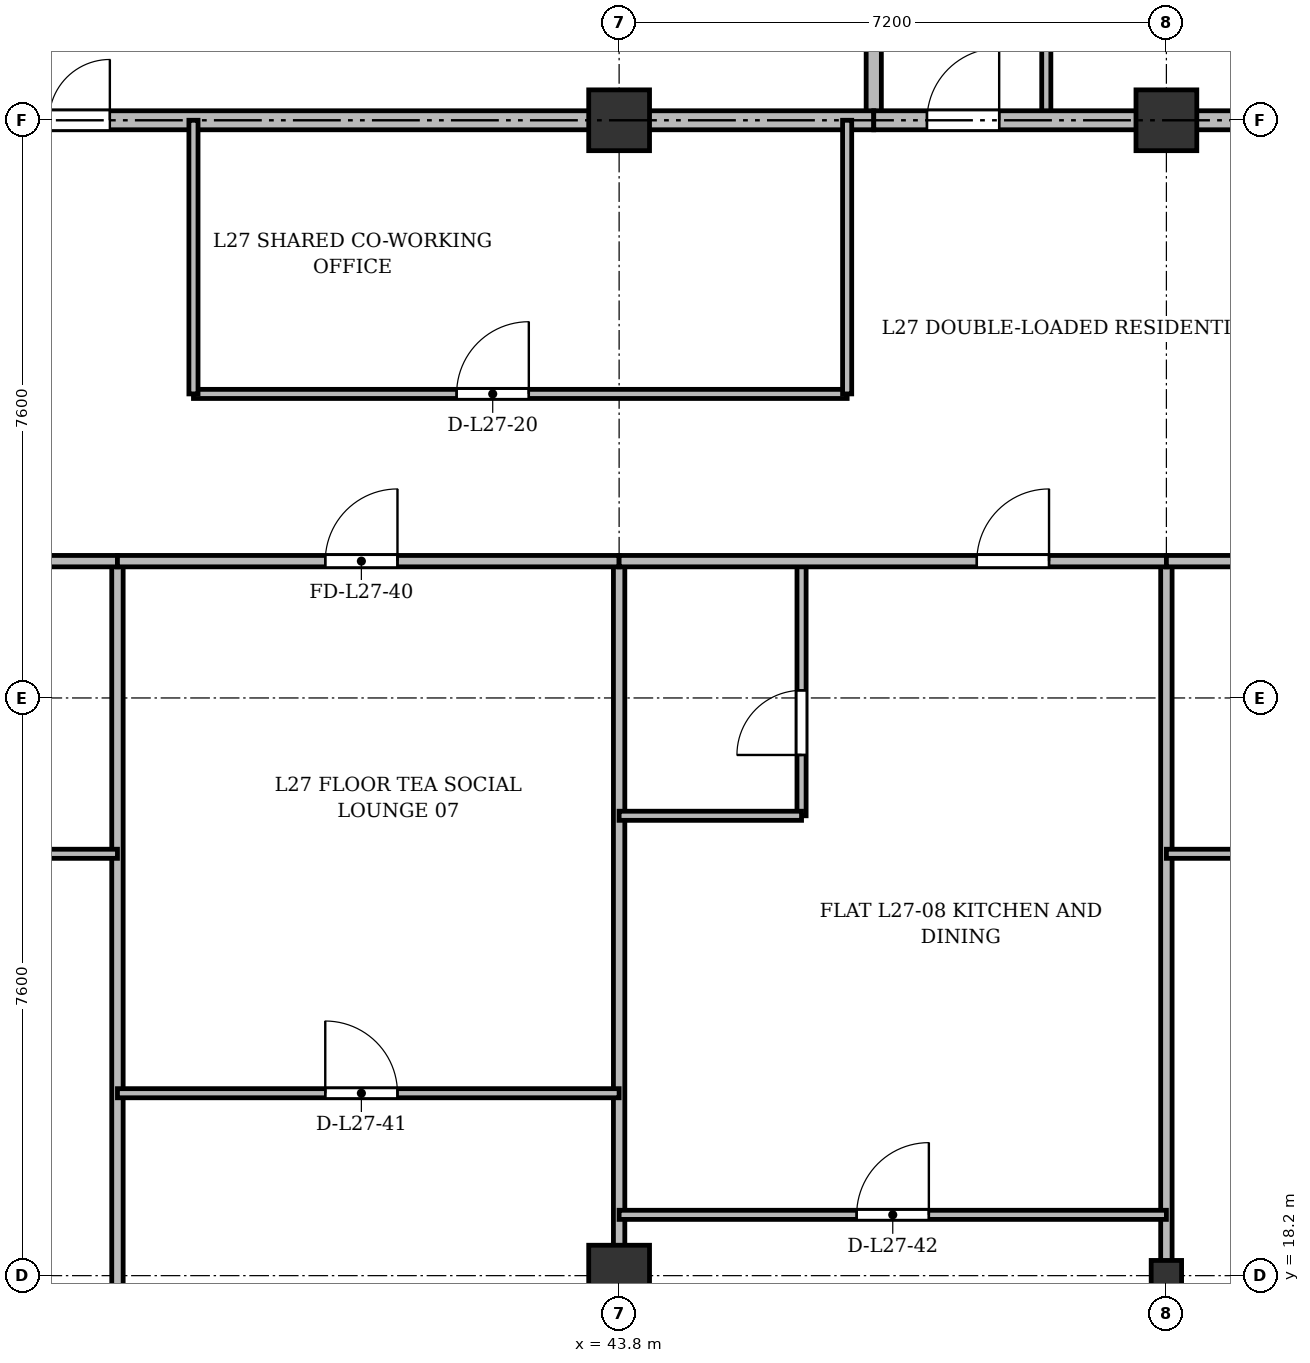
"""IFC4 building model, lengths in metres.
Left out: names, types, materials, properties, quantities, classifications, styles, units other than length and angle.
Written with IfcOpenShell. Run it as: python <this file> out.ifc"""

import sys

from ifc_helpers import new_model, si_unit, direction, frame, frame_2d, origin, origin_2d, place, context, subcontext, project, spatial, rectangle, i_section, extrude, source, transform, mapped, element, fill, save


model = new_model("IFC4")
c1 = context("Model", 3, precision=1e-05, world=origin(), true_north=direction((0.0, 1.0)))
c2 = subcontext(c1, "Body", "Model", "MODEL_VIEW")
j1 = project(units=[si_unit("LENGTHUNIT", "METRE"), si_unit("PLANEANGLEUNIT", "RADIAN")], contexts=[c1])
p1 = place(None, origin())
s1 = spatial("IfcSite", under=j1, at=p1, CompositionType="ELEMENT")
p2 = place(p1, origin())
s2 = spatial("IfcBuilding", under=s1, at=p2, CompositionType="ELEMENT")
p3 = place(p2, frame((0.0, 0.0, 106.9)))
s3 = spatial("IfcBuildingStorey", under=s2, at=p3, CompositionType="ELEMENT", Elevation=106.9)
m1 = source(origin(), c2, "Body", "SweptSolid", [
    extrude(rectangle(XDim=0.8, YDim=0.8, at=origin_2d()), origin(), (0.0, 0.0, 1.0), 3.6),
])
for number, where, z_axis, x_axis in (
    (1, (43.8, 18.2, 0.0), (0.0, 0.0, 1.0), (1.0, 0.0, 0.0)),
    (2, (43.8, 33.4, 0.0), (0.0, 0.0, 1.0), (1.0, 0.0, 0.0)),
):
    element("IfcColumn", number, at=place(p3, frame(where, z_axis=z_axis, x_axis=x_axis)), inside=s3, PredefinedType="COLUMN", context=c2, shape_type="MappedRepresentation", body=[
        mapped(m1, transform((0.0, 0.0, 0.0), x_axis=(1.0, 0.0, 0.0), y_axis=(0.0, 1.0, 0.0), z_axis=(0.0, 0.0, 1.0), scale=1.0)),
    ])
m2 = source(origin(), c2, "Body", "SweptSolid", [
    extrude(i_section(OverallWidth=0.4, OverallDepth=0.4, WebThickness=0.022, FlangeThickness=0.035, at=origin_2d()), origin(), (0.0, 0.0, 1.0), 3.6),
])
p4 = place(p3, frame((51.0, 18.2, 0.0), z_axis=(0.0, 0.0, 1.0), x_axis=(1.0, 0.0, 0.0)))
e3 = element("IfcColumn", 3, at=p4, inside=s3, PredefinedType="COLUMN", context=c2, shape_type="MappedRepresentation", body=[
    mapped(m2, transform((0.0, 0.0, 0.0), x_axis=(1.0, 0.0, 0.0), y_axis=(0.0, 1.0, 0.0), z_axis=(0.0, 0.0, 1.0), scale=1.0)),
])
p5 = place(p3, frame((51.0, 33.4, 0.0), z_axis=(0.0, 0.0, 1.0), x_axis=(1.0, 0.0, 0.0)))
e4 = element("IfcColumn", 4, at=p5, inside=s3, PredefinedType="COLUMN", context=c2, shape_type="MappedRepresentation", body=[
    mapped(m1, transform((0.0, 0.0, 0.0), x_axis=(1.0, 0.0, 0.0), y_axis=(0.0, 1.0, 0.0), z_axis=(0.0, 0.0, 1.0), scale=1.0)),
])
p6 = place(p3, frame((47.15, 33.4, 0.0), z_axis=(0.0, 0.0, 1.0), x_axis=(0.0, 1.0, 0.0)))
e5 = element("IfcWall", 5, at=p6, inside=s3, PredefinedType="SOLIDWALL", context=c2, shape_type="SweptSolid", body=[
    extrude(rectangle(XDim=11.3, YDim=0.2, at=frame_2d((5.65, 0.0))), origin(), (0.0, 0.0, 1.0), 2.752),
])
p7 = place(p3, frame((26.3, 33.4, 0.0), z_axis=(0.0, 0.0, 1.0), x_axis=(1.0, 0.0, 0.0)))
e6 = element("IfcWall", 6, at=p7, inside=s3, PredefinedType="PARTITIONING", context=c2, shape_type="SweptSolid", body=[
    extrude(rectangle(XDim=20.85, YDim=0.25, at=frame_2d((10.425, 0.0))), origin(), (0.0, 0.0, 1.0), 2.752),
])
p8 = place(p7, frame((9.2, 0.0, 0.0)))
e7 = element("IfcOpeningElement", 7, at=p8, cuts=e6, PredefinedType="OPENING", context=c2, shape_type="SweptSolid", body=[
    extrude(rectangle(XDim=1.6, YDim=2.2, at=frame_2d((0.8, 1.1))), frame((0.0, 0.135, 0.0), z_axis=(0.0, -1.0, 0.0), x_axis=(1.0, 0.0, 0.0)), (0.0, 0.0, 1.0), 0.27),
])
p9 = place(p3, frame((49.42, 33.4, 0.0), z_axis=(0.0, 0.0, 1.0), x_axis=(0.0, 1.0, 0.0)))
e8 = element("IfcWall", 8, at=p9, inside=s3, PredefinedType="PARTITIONING", context=c2, shape_type="SweptSolid", body=[
    extrude(rectangle(XDim=8.6, YDim=0.12, at=frame_2d((4.3, 0.0))), origin(), (0.0, 0.0, 1.0), 2.752),
])
p10 = place(p9, frame((1.3, 0.0, 0.0)))
e9 = element("IfcOpeningElement", 9, at=p10, cuts=e8, PredefinedType="OPENING", context=c2, shape_type="SweptSolid", body=[
    extrude(rectangle(XDim=0.95, YDim=2.15, at=frame_2d((0.475, 1.075))), frame((0.0, 0.07, 0.0), z_axis=(0.0, -1.0, 0.0), x_axis=(1.0, 0.0, 0.0)), (0.0, 0.0, 1.0), 0.14),
])
p11 = place(p9, frame((5.5, 0.0, 0.0)))
e10 = element("IfcOpeningElement", 10, at=p11, cuts=e8, PredefinedType="OPENING", context=c2, shape_type="SweptSolid", body=[
    extrude(rectangle(XDim=0.95, YDim=2.15, at=frame_2d((0.475, 1.075))), frame((0.0, 0.07, 0.0), z_axis=(0.0, -1.0, 0.0), x_axis=(1.0, 0.0, 0.0)), (0.0, 0.0, 1.0), 0.14),
])
p12 = place(p3, frame((47.15, 33.4, 0.0), z_axis=(0.0, 0.0, 1.0), x_axis=(1.0, 0.0, 0.0)))
e11 = element("IfcWall", 11, at=p12, inside=s3, PredefinedType="PARTITIONING", context=c2, shape_type="SweptSolid", body=[
    extrude(rectangle(XDim=11.15, YDim=0.25, at=frame_2d((5.575, 0.0))), origin(), (0.0, 0.0, 1.0), 2.752),
])
p13 = place(p12, frame((0.7, 0.0, 0.0)))
e12 = element("IfcOpeningElement", 12, at=p13, cuts=e11, PredefinedType="OPENING", context=c2, shape_type="SweptSolid", body=[
    extrude(rectangle(XDim=0.95, YDim=2.15, at=frame_2d((0.475, 1.075))), frame((0.0, 0.135, 0.0), z_axis=(0.0, -1.0, 0.0), x_axis=(1.0, 0.0, 0.0)), (0.0, 0.0, 1.0), 0.27),
])
p14 = place(p12, frame((6.0, 0.0, 0.0)))
e13 = element("IfcOpeningElement", 13, at=p14, cuts=e11, PredefinedType="OPENING", context=c2, shape_type="SweptSolid", body=[
    extrude(rectangle(XDim=1.2, YDim=2.15, at=frame_2d((0.6, 1.075))), frame((0.0, 0.135, 0.0), z_axis=(0.0, -1.0, 0.0), x_axis=(1.0, 0.0, 0.0)), (0.0, 0.0, 1.0), 0.27),
])
p15 = place(p3, frame((38.2, 29.8, 0.0), z_axis=(0.0, 0.0, 1.0), x_axis=(1.0, 0.0, 0.0)))
e14 = element("IfcWall", 14, at=p15, inside=s3, PredefinedType="PARTITIONING", context=c2, shape_type="SweptSolid", body=[
    extrude(rectangle(XDim=8.6, YDim=0.12, at=frame_2d((4.3, 0.0))), origin(), (0.0, 0.0, 1.0), 2.84),
])
p16 = place(p15, frame((3.462, 0.0, 0.0)))
e15 = element("IfcOpeningElement", 15, at=p16, cuts=e14, PredefinedType="OPENING", context=c2, shape_type="SweptSolid", body=[
    extrude(rectangle(XDim=0.95, YDim=2.15, at=frame_2d((0.475, 1.075))), frame((0.0, 0.07, 0.0), z_axis=(0.0, -1.0, 0.0), x_axis=(1.0, 0.0, 0.0)), (0.0, 0.0, 1.0), 0.14),
])
for number, where, z_axis, x_axis in (
    (16, (38.2, 29.8, 0.0), (0.0, 0.0, 1.0), (0.0, 1.0, 0.0)),
    (17, (46.8, 29.8, 0.0), (0.0, 0.0, 1.0), (0.0, 1.0, 0.0)),
):
    element("IfcWall", number, at=place(p3, frame(where, z_axis=z_axis, x_axis=x_axis)), inside=s3, PredefinedType="PARTITIONING", context=c2, shape_type="SweptSolid", body=[
        extrude(rectangle(XDim=3.6, YDim=0.12, at=frame_2d((1.8, 0.0))), origin(), (0.0, 0.0, 1.0), 2.752),
    ])
p17 = place(p3, frame((37.2, 3.145, 0.0), z_axis=(0.0, 0.0, 1.0), x_axis=(0.0, 1.0, 0.0)))
e18 = element("IfcWall", 18, at=p17, inside=s3, PredefinedType="PARTITIONING", context=c2, shape_type="SweptSolid", body=[
    extrude(rectangle(XDim=24.455, YDim=0.15, at=frame_2d((12.228, 0.0))), origin(), (0.0, 0.0, 1.0), 2.752),
])
for number, where, z_axis, x_axis in (
    (19, (43.8, 3.145, 0.0), (0.0, 0.0, 1.0), (0.0, 1.0, 0.0)),
    (20, (51.0, 3.145, 0.0), (0.0, 0.0, 1.0), (0.0, 1.0, 0.0)),
):
    element("IfcWall", number, at=place(p3, frame(where, z_axis=z_axis, x_axis=x_axis)), inside=s3, PredefinedType="PARTITIONING", context=c2, shape_type="SweptSolid", body=[
        extrude(rectangle(XDim=24.455, YDim=0.15, at=frame_2d((12.228, 0.0))), origin(), (0.0, 0.0, 1.0), 2.84),
    ])
p18 = place(p3, frame((30.6, 27.6, 0.0), z_axis=(0.0, 0.0, 1.0), x_axis=(1.0, 0.0, 0.0)))
e21 = element("IfcWall", 21, at=p18, inside=s3, PredefinedType="PARTITIONING", context=c2, shape_type="SweptSolid", body=[
    extrude(rectangle(XDim=6.6, YDim=0.15, at=frame_2d((3.3, 0.0))), origin(), (0.0, 0.0, 1.0), 2.84),
])
p19 = place(p18, frame((2.734, 0.0, 0.0)))
e22 = element("IfcOpeningElement", 22, at=p19, cuts=e21, PredefinedType="OPENING", context=c2, shape_type="SweptSolid", body=[
    extrude(rectangle(XDim=0.95, YDim=2.15, at=frame_2d((0.475, 1.075))), frame((0.0, 0.085, 0.0), z_axis=(0.0, -1.0, 0.0), x_axis=(1.0, 0.0, 0.0)), (0.0, 0.0, 1.0), 0.17),
])
p20 = place(p3, frame((30.6, 23.75, 0.0), z_axis=(0.0, 0.0, 1.0), x_axis=(1.0, 0.0, 0.0)))
e23 = element("IfcWall", 23, at=p20, inside=s3, PredefinedType="PARTITIONING", context=c2, shape_type="SweptSolid", body=[
    extrude(rectangle(XDim=6.6, YDim=0.12, at=frame_2d((3.3, 0.0))), origin(), (0.0, 0.0, 1.0), 2.84),
])
p21 = place(p20, frame((2.734, 0.0, 0.0)))
e24 = element("IfcOpeningElement", 24, at=p21, cuts=e23, PredefinedType="OPENING", context=c2, shape_type="SweptSolid", body=[
    extrude(rectangle(XDim=0.95, YDim=2.15, at=frame_2d((0.475, 1.075))), frame((0.0, 0.07, 0.0), z_axis=(0.0, -1.0, 0.0), x_axis=(1.0, 0.0, 0.0)), (0.0, 0.0, 1.0), 0.14),
])
p22 = place(p3, frame((37.2, 27.6, 0.0), z_axis=(0.0, 0.0, 1.0), x_axis=(1.0, 0.0, 0.0)))
e25 = element("IfcWall", 25, at=p22, inside=s3, PredefinedType="PARTITIONING", context=c2, shape_type="SweptSolid", body=[
    extrude(rectangle(XDim=6.6, YDim=0.15, at=frame_2d((3.3, 0.0))), origin(), (0.0, 0.0, 1.0), 2.84),
])
p23 = place(p22, frame((2.734, 0.0, 0.0)))
e26 = element("IfcOpeningElement", 26, at=p23, cuts=e25, PredefinedType="OPENING", context=c2, shape_type="SweptSolid", body=[
    extrude(rectangle(XDim=0.95, YDim=2.15, at=frame_2d((0.475, 1.075))), frame((0.0, 0.085, 0.0), z_axis=(0.0, -1.0, 0.0), x_axis=(1.0, 0.0, 0.0)), (0.0, 0.0, 1.0), 0.17),
])
p24 = place(p3, frame((37.2, 20.6, 0.0), z_axis=(0.0, 0.0, 1.0), x_axis=(1.0, 0.0, 0.0)))
e27 = element("IfcWall", 27, at=p24, inside=s3, PredefinedType="PARTITIONING", context=c2, shape_type="SweptSolid", body=[
    extrude(rectangle(XDim=6.6, YDim=0.12, at=frame_2d((3.3, 0.0))), origin(), (0.0, 0.0, 1.0), 2.84),
])
p25 = place(p24, frame((2.734, 0.0, 0.0)))
e28 = element("IfcOpeningElement", 28, at=p25, cuts=e27, PredefinedType="OPENING", context=c2, shape_type="SweptSolid", body=[
    extrude(rectangle(XDim=0.95, YDim=2.15, at=frame_2d((0.475, 1.075))), frame((0.0, 0.07, 0.0), z_axis=(0.0, -1.0, 0.0), x_axis=(1.0, 0.0, 0.0)), (0.0, 0.0, 1.0), 0.14),
])
p26 = place(p3, frame((43.8, 19.0, 0.0), z_axis=(0.0, 0.0, 1.0), x_axis=(1.0, 0.0, 0.0)))
e29 = element("IfcWall", 29, at=p26, inside=s3, PredefinedType="PARTITIONING", context=c2, shape_type="SweptSolid", body=[
    extrude(rectangle(XDim=7.2, YDim=0.12, at=frame_2d((3.6, 0.0))), origin(), (0.0, 0.0, 1.0), 2.84),
])
p27 = place(p26, frame((3.125, 0.0, 0.0)))
e30 = element("IfcOpeningElement", 30, at=p27, cuts=e29, PredefinedType="OPENING", context=c2, shape_type="SweptSolid", body=[
    extrude(rectangle(XDim=0.95, YDim=2.15, at=frame_2d((0.475, 1.075))), frame((0.0, 0.07, 0.0), z_axis=(0.0, -1.0, 0.0), x_axis=(1.0, 0.0, 0.0)), (0.0, 0.0, 1.0), 0.14),
])
p28 = place(p3, frame((46.2, 24.25, 0.0), z_axis=(0.0, 0.0, 1.0), x_axis=(0.0, 1.0, 0.0)))
e31 = element("IfcWall", 31, at=p28, inside=s3, PredefinedType="PARTITIONING", context=c2, shape_type="SweptSolid", body=[
    extrude(rectangle(XDim=3.35, YDim=0.12, at=frame_2d((1.675, 0.0))), origin(), (0.0, 0.0, 1.0), 2.99),
])
p29 = place(p28, frame((0.8, 0.0, 0.0)))
e32 = element("IfcOpeningElement", 32, at=p29, cuts=e31, PredefinedType="OPENING", context=c2, shape_type="SweptSolid", body=[
    extrude(rectangle(XDim=0.85, YDim=2.1, at=frame_2d((0.425, 1.05))), frame((0.0, 0.07, 0.0), z_axis=(0.0, -1.0, 0.0), x_axis=(1.0, 0.0, 0.0)), (0.0, 0.0, 1.0), 0.14),
])
p30 = place(p3, frame((43.8, 24.25, 0.0), z_axis=(0.0, 0.0, 1.0), x_axis=(1.0, 0.0, 0.0)))
e33 = element("IfcWall", 33, at=p30, inside=s3, PredefinedType="PARTITIONING", context=c2, shape_type="SweptSolid", body=[
    extrude(rectangle(XDim=2.4, YDim=0.12, at=frame_2d((1.2, 0.0))), origin(), (0.0, 0.0, 1.0), 2.84),
])
p31 = place(p3, frame((43.8, 27.6, 0.0), z_axis=(0.0, 0.0, 1.0), x_axis=(1.0, 0.0, 0.0)))
e34 = element("IfcWall", 34, at=p31, inside=s3, PredefinedType="PARTITIONING", context=c2, shape_type="SweptSolid", body=[
    extrude(rectangle(XDim=7.2, YDim=0.15, at=frame_2d((3.6, 0.0))), origin(), (0.0, 0.0, 1.0), 2.84),
])
p32 = place(p31, frame((4.706, 0.0, 0.0)))
e35 = element("IfcOpeningElement", 35, at=p32, cuts=e34, PredefinedType="OPENING", context=c2, shape_type="SweptSolid", body=[
    extrude(rectangle(XDim=0.95, YDim=2.15, at=frame_2d((0.475, 1.075))), frame((0.0, 0.085, 0.0), z_axis=(0.0, -1.0, 0.0), x_axis=(1.0, 0.0, 0.0)), (0.0, 0.0, 1.0), 0.17),
])
p33 = place(p3, frame((51.0, 27.6, 0.0), z_axis=(0.0, 0.0, 1.0), x_axis=(1.0, 0.0, 0.0)))
e36 = element("IfcWall", 36, at=p33, inside=s3, PredefinedType="PARTITIONING", context=c2, shape_type="SweptSolid", body=[
    extrude(rectangle(XDim=4.0, YDim=0.15, at=frame_2d((2.0, 0.0))), origin(), (0.0, 0.0, 1.0), 2.84),
])
p34 = place(p33, frame((1.525, 0.0, 0.0)))
e37 = element("IfcOpeningElement", 37, at=p34, cuts=e36, PredefinedType="OPENING", context=c2, shape_type="SweptSolid", body=[
    extrude(rectangle(XDim=0.95, YDim=2.15, at=frame_2d((0.475, 1.075))), frame((0.0, 0.085, 0.0), z_axis=(0.0, -1.0, 0.0), x_axis=(1.0, 0.0, 0.0)), (0.0, 0.0, 1.0), 0.17),
])
p35 = place(p3, frame((51.0, 23.75, 0.0), z_axis=(0.0, 0.0, 1.0), x_axis=(1.0, 0.0, 0.0)))
e38 = element("IfcWall", 38, at=p35, inside=s3, PredefinedType="PARTITIONING", context=c2, shape_type="SweptSolid", body=[
    extrude(rectangle(XDim=4.0, YDim=0.12, at=frame_2d((2.0, 0.0))), origin(), (0.0, 0.0, 1.0), 2.84),
])
p36 = place(p35, frame((1.525, 0.0, 0.0)))
e39 = element("IfcOpeningElement", 39, at=p36, cuts=e38, PredefinedType="OPENING", context=c2, shape_type="SweptSolid", body=[
    extrude(rectangle(XDim=0.95, YDim=2.15, at=frame_2d((0.475, 1.075))), frame((0.0, 0.07, 0.0), z_axis=(0.0, -1.0, 0.0), x_axis=(1.0, 0.0, 0.0)), (0.0, 0.0, 1.0), 0.14),
])
m3 = source(origin(), c2, "Body", "SweptSolid", [
    extrude(rectangle(XDim=1.6, YDim=2.2, at=frame_2d((0.8, 1.1))), frame((0.0, 0.025, 0.0), z_axis=(0.0, -1.0, 0.0), x_axis=(1.0, 0.0, 0.0)), (0.0, 0.0, 1.0), 0.05),
])
p37 = place(p8, origin())
e40 = element("IfcDoor", 40, at=p37, inside=s3, OperationType="DOUBLE_DOOR_SINGLE_SWING", PredefinedType="DOOR", context=c2, shape_type="MappedRepresentation", body=[
    mapped(m3, transform((0.0, 0.0, 0.0), x_axis=(1.0, 0.0, 0.0), y_axis=(0.0, 1.0, 0.0), z_axis=(0.0, 0.0, 1.0), scale=1.0)),
])
fill(e7, e40)
m4 = source(origin(), c2, "Body", "SweptSolid", [
    extrude(rectangle(XDim=0.95, YDim=2.15, at=frame_2d((0.475, 1.075))), frame((0.0, 0.025, 0.0), z_axis=(0.0, -1.0, 0.0), x_axis=(1.0, 0.0, 0.0)), (0.0, 0.0, 1.0), 0.05),
])
p38 = place(p13, origin())
e41 = element("IfcDoor", 41, at=p38, inside=s3, OperationType="SINGLE_SWING_RIGHT", PredefinedType="DOOR", context=c2, shape_type="MappedRepresentation", body=[
    mapped(m4, transform((0.0, 0.0, 0.0), x_axis=(1.0, 0.0, 0.0), y_axis=(0.0, 1.0, 0.0), z_axis=(0.0, 0.0, 1.0), scale=1.0)),
])
fill(e12, e41)
p39 = place(p16, origin())
e42 = element("IfcDoor", 42, at=p39, inside=s3, OperationType="SINGLE_SWING_RIGHT", PredefinedType="DOOR", context=c2, shape_type="MappedRepresentation", body=[
    mapped(m4, transform((0.0, 0.0, 0.0), x_axis=(1.0, 0.0, 0.0), y_axis=(0.0, 1.0, 0.0), z_axis=(0.0, 0.0, 1.0), scale=1.0)),
])
fill(e15, e42)
p40 = place(p23, origin())
e43 = element("IfcDoor", 43, at=p40, inside=s3, OperationType="SINGLE_SWING_RIGHT", PredefinedType="DOOR", context=c2, shape_type="MappedRepresentation", body=[
    mapped(m4, transform((0.0, 0.0, 0.0), x_axis=(1.0, 0.0, 0.0), y_axis=(0.0, 1.0, 0.0), z_axis=(0.0, 0.0, 1.0), scale=1.0)),
])
fill(e26, e43)
p41 = place(p25, origin())
e44 = element("IfcDoor", 44, at=p41, inside=s3, OperationType="SINGLE_SWING_LEFT", PredefinedType="DOOR", context=c2, shape_type="MappedRepresentation", body=[
    mapped(m4, transform((0.0, 0.0, 0.0), x_axis=(1.0, 0.0, 0.0), y_axis=(0.0, 1.0, 0.0), z_axis=(0.0, 0.0, 1.0), scale=1.0)),
])
fill(e28, e44)
p42 = place(p27, origin())
e45 = element("IfcDoor", 45, at=p42, inside=s3, OperationType="SINGLE_SWING_RIGHT", PredefinedType="DOOR", context=c2, shape_type="MappedRepresentation", body=[
    mapped(m4, transform((0.0, 0.0, 0.0), x_axis=(1.0, 0.0, 0.0), y_axis=(0.0, 1.0, 0.0), z_axis=(0.0, 0.0, 1.0), scale=1.0)),
])
fill(e30, e45)
m5 = source(origin(), c2, "Body", "SweptSolid", [
    extrude(rectangle(XDim=0.85, YDim=2.1, at=frame_2d((0.425, 1.05))), frame((0.0, 0.025, 0.0), z_axis=(0.0, -1.0, 0.0), x_axis=(1.0, 0.0, 0.0)), (0.0, 0.0, 1.0), 0.05),
])
p43 = place(p29, origin())
e46 = element("IfcDoor", 46, at=p43, inside=s3, OperationType="SINGLE_SWING_LEFT", PredefinedType="DOOR", context=c2, shape_type="MappedRepresentation", body=[
    mapped(m5, transform((0.0, 0.0, 0.0), x_axis=(1.0, 0.0, 0.0), y_axis=(0.0, 1.0, 0.0), z_axis=(0.0, 0.0, 1.0), scale=1.0)),
])
fill(e32, e46)
p44 = place(p32, origin())
e47 = element("IfcDoor", 47, at=p44, inside=s3, OperationType="SINGLE_SWING_RIGHT", PredefinedType="DOOR", context=c2, shape_type="MappedRepresentation", body=[
    mapped(m4, transform((0.0, 0.0, 0.0), x_axis=(1.0, 0.0, 0.0), y_axis=(0.0, 1.0, 0.0), z_axis=(0.0, 0.0, 1.0), scale=1.0)),
])
fill(e35, e47)
save(model, sys.argv[1])
